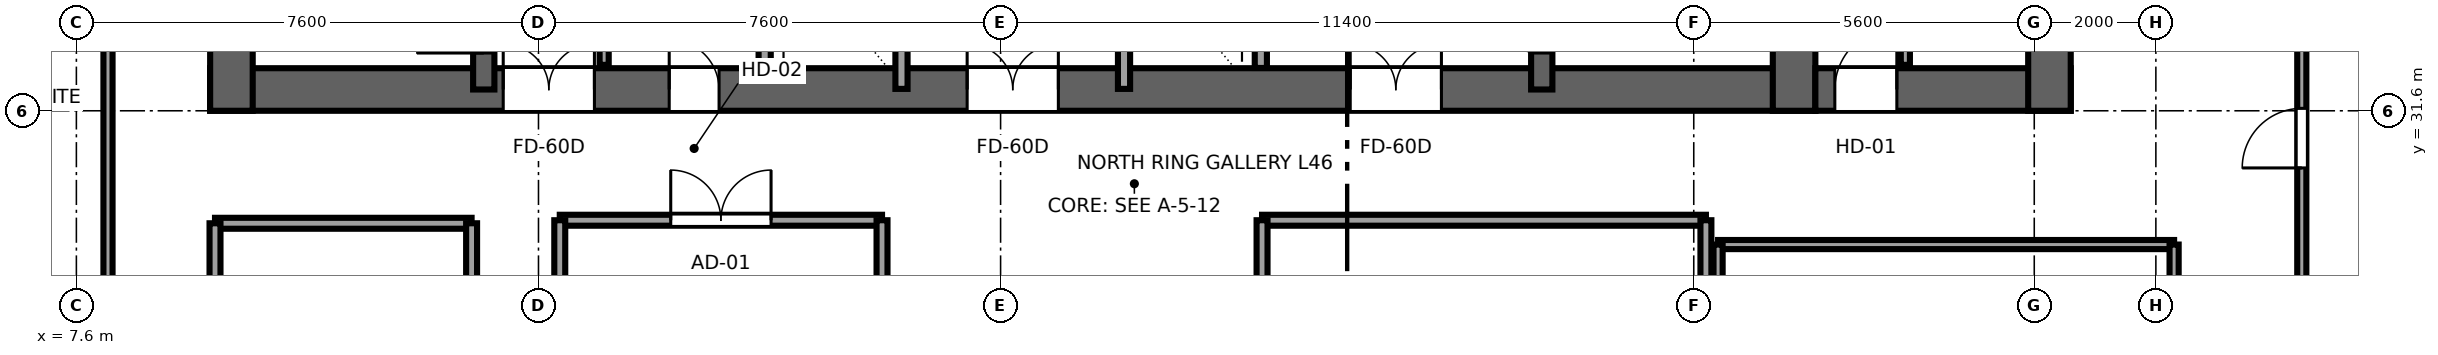
"""IFC4 building model, lengths in metres.
Left out: names, types, materials, properties, quantities, classifications, styles, units other than length and angle.
Written with IfcOpenShell. Run it as: python <this file> out.ifc"""

import sys

from ifc_helpers import new_model, si_unit, direction, frame, frame_2d, origin, place, context, subcontext, project, spatial, rectangle, extrude, source, transform, mapped, element, fill, save


model = new_model("IFC4")
c1 = context("Model", 3, precision=1e-05, world=origin(), true_north=direction((0.0, 1.0)))
c2 = subcontext(c1, "Body", "Model", "MODEL_VIEW")
j1 = project(units=[si_unit("LENGTHUNIT", "METRE"), si_unit("PLANEANGLEUNIT", "RADIAN")], contexts=[c1])
p1 = place(None, origin())
s1 = spatial("IfcSite", under=j1, at=p1, CompositionType="ELEMENT")
p2 = place(p1, origin())
s2 = spatial("IfcBuilding", under=s1, at=p2, CompositionType="ELEMENT")
p3 = place(p2, frame((0.0, 0.0, 175.45)))
s3 = spatial("IfcBuildingStorey", under=s2, at=p3, CompositionType="ELEMENT", Elevation=175.45)
p4 = place(p3, frame((9.8, 31.95, 0.0), z_axis=(0.0, 0.0, 1.0), x_axis=(1.0, 0.0, 0.0)))
e1 = element("IfcWall", 1, at=p4, inside=s3, PredefinedType="SHEAR", context=c2, shape_type="SweptSolid", body=[
    extrude(rectangle(XDim=26.4, YDim=0.7, at=frame_2d((13.2, 0.0))), origin(), (0.0, 0.0, 1.0), 3.55),
])
p5 = place(p4, frame((6.32, 0.0, 0.0), z_axis=(0.0, 0.0, 1.0), x_axis=(-1.0, 0.0, 0.0)))
e2 = element("IfcOpeningElement", 2, at=p5, cuts=e1, PredefinedType="OPENING", context=c2, shape_type="SweptSolid", body=[
    extrude(rectangle(XDim=1.5, YDim=2.04, at=frame_2d((0.75, 1.02))), frame((0.0, 0.36, 0.0), z_axis=(0.0, -1.0, 0.0), x_axis=(1.0, 0.0, 0.0)), (0.0, 0.0, 1.0), 0.72),
])
p6 = place(p4, frame((13.95, 0.0, 0.0), z_axis=(0.0, 0.0, 1.0), x_axis=(-1.0, 0.0, 0.0)))
e3 = element("IfcOpeningElement", 3, at=p6, cuts=e1, PredefinedType="OPENING", context=c2, shape_type="SweptSolid", body=[
    extrude(rectangle(XDim=1.5, YDim=2.04, at=frame_2d((0.75, 1.02))), frame((0.0, 0.36, 0.0), z_axis=(0.0, -1.0, 0.0), x_axis=(1.0, 0.0, 0.0)), (0.0, 0.0, 1.0), 0.72),
])
p7 = place(p4, frame((20.25, 0.0, 0.0), z_axis=(0.0, 0.0, 1.0), x_axis=(-1.0, 0.0, 0.0)))
e4 = element("IfcOpeningElement", 4, at=p7, cuts=e1, PredefinedType="OPENING", context=c2, shape_type="SweptSolid", body=[
    extrude(rectangle(XDim=1.5, YDim=2.04, at=frame_2d((0.75, 1.02))), frame((0.0, 0.36, 0.0), z_axis=(0.0, -1.0, 0.0), x_axis=(1.0, 0.0, 0.0)), (0.0, 0.0, 1.0), 0.72),
])
p8 = place(p4, frame((8.37, 0.0, 0.0), z_axis=(0.0, 0.0, 1.0), x_axis=(-1.0, 0.0, 0.0)))
e5 = element("IfcOpeningElement", 5, at=p8, cuts=e1, PredefinedType="OPENING", context=c2, shape_type="SweptSolid", body=[
    extrude(rectangle(XDim=0.82, YDim=2.01, at=frame_2d((0.41, 1.005))), frame((0.0, 0.36, 0.0), z_axis=(0.0, -1.0, 0.0), x_axis=(1.0, 0.0, 0.0)), (0.0, 0.0, 1.0), 0.72),
])
for number, where, z_axis, x_axis in (
    (6, (10.15, 31.6, 0.0), (0.0, 0.0, 1.0), (0.0, 1.0, 0.0)),
    (7, (35.85, 31.6, 0.0), (0.0, 0.0, 1.0), (0.0, 1.0, 0.0)),
):
    element("IfcWall", number, at=place(p3, frame(where, z_axis=z_axis, x_axis=x_axis)), inside=s3, PredefinedType="SHEAR", context=c2, shape_type="SweptSolid", body=[
        extrude(rectangle(XDim=13.6, YDim=0.7, at=frame_2d((6.8, 0.0))), origin(), (0.0, 0.0, 1.0), 3.55),
    ])
p9 = place(p3, frame((14.3, 31.95, 0.0), z_axis=(0.0, 0.0, 1.0), x_axis=(0.0, 1.0, 0.0)))
e8 = element("IfcWall", 8, at=p9, inside=s3, PredefinedType="SHEAR", context=c2, shape_type="SweptSolid", body=[
    extrude(rectangle(XDim=12.9, YDim=0.35, at=frame_2d((6.45, 0.0))), origin(), (0.0, 0.0, 1.0), 3.55),
])
p10 = place(p9, frame((0.6, 0.0, 0.0)))
e9 = element("IfcOpeningElement", 9, at=p10, cuts=e8, PredefinedType="OPENING", context=c2, shape_type="SweptSolid", body=[
    extrude(rectangle(XDim=1.1, YDim=2.12, at=frame_2d((0.55, 1.06))), frame((0.0, 0.185, 0.0), z_axis=(0.0, -1.0, 0.0), x_axis=(1.0, 0.0, 0.0)), (0.0, 0.0, 1.0), 0.37),
])
p11 = place(p3, frame((31.7, 31.95, 0.0), z_axis=(0.0, 0.0, 1.0), x_axis=(0.0, 1.0, 0.0)))
e10 = element("IfcWall", 10, at=p11, inside=s3, PredefinedType="SHEAR", context=c2, shape_type="SweptSolid", body=[
    extrude(rectangle(XDim=12.9, YDim=0.35, at=frame_2d((6.45, 0.0))), origin(), (0.0, 0.0, 1.0), 3.55),
])
p12 = place(p11, frame((1.7, 0.0, 0.0), z_axis=(0.0, 0.0, 1.0), x_axis=(-1.0, 0.0, 0.0)))
e11 = element("IfcOpeningElement", 11, at=p12, cuts=e10, PredefinedType="OPENING", context=c2, shape_type="SweptSolid", body=[
    extrude(rectangle(XDim=1.1, YDim=2.12, at=frame_2d((0.55, 1.06))), frame((0.0, 0.185, 0.0), z_axis=(0.0, -1.0, 0.0), x_axis=(1.0, 0.0, 0.0)), (0.0, 0.0, 1.0), 0.37),
])
p13 = place(p3, frame((36.2, 31.95, 0.0), z_axis=(0.0, 0.0, 1.0), x_axis=(1.0, 0.0, 0.0)))
e12 = element("IfcWall", 12, at=p13, inside=s3, PredefinedType="SHEAR", context=c2, shape_type="SweptSolid", body=[
    extrude(rectangle(XDim=4.2, YDim=0.7, at=frame_2d((2.1, 0.0))), origin(), (0.0, 0.0, 1.0), 3.55),
])
p14 = place(p13, frame((1.34, 0.0, 0.0), z_axis=(0.0, 0.0, 1.0), x_axis=(-1.0, 0.0, 0.0)))
e13 = element("IfcOpeningElement", 13, at=p14, cuts=e12, PredefinedType="OPENING", context=c2, shape_type="SweptSolid", body=[
    extrude(rectangle(XDim=1.02, YDim=2.03, at=frame_2d((0.51, 1.015))), frame((0.0, 0.36, 0.0), z_axis=(0.0, -1.0, 0.0), x_axis=(1.0, 0.0, 0.0)), (0.0, 0.0, 1.0), 0.72),
])
p15 = place(p3, frame((40.05, 31.6, 0.0), z_axis=(0.0, 0.0, 1.0), x_axis=(0.0, 1.0, 0.0)))
e14 = element("IfcWall", 14, at=p15, inside=s3, PredefinedType="SHEAR", context=c2, shape_type="SweptSolid", body=[
    extrude(rectangle(XDim=13.6, YDim=0.7, at=frame_2d((6.8, 0.0))), origin(), (0.0, 0.0, 1.0), 3.55),
])
for number, where, z_axis, x_axis in (
    (15, (18.92, 32.304, 0.0), (0.0, 0.0, 1.0), (0.0, 1.0, 0.0)),
    (16, (27.08, 32.304, 0.0), (0.0, 0.0, 1.0), (0.0, 1.0, 0.0)),
):
    element("IfcWall", number, at=place(p3, frame(where, z_axis=z_axis, x_axis=x_axis)), inside=s3, PredefinedType="SOLIDWALL", context=c2, shape_type="SweptSolid", body=[
        extrude(rectangle(XDim=3.846, YDim=0.2, at=frame_2d((1.923, 0.0))), origin(), (0.0, 0.0, 1.0), 3.37),
    ])
p16 = place(p3, frame((21.17, 31.96, 0.0), z_axis=(0.0, 0.0, 1.0), x_axis=(0.0, 1.0, 0.0)))
e17 = element("IfcWall", 17, at=p16, inside=s3, PredefinedType="SOLIDWALL", context=c2, shape_type="SweptSolid", body=[
    extrude(rectangle(XDim=12.58, YDim=0.2, at=frame_2d((6.29, 0.0))), origin(), (0.0, 0.0, 1.0), 3.37),
])
p17 = place(p16, frame((5.74, 0.0, 0.0)))
e18 = element("IfcOpeningElement", 18, at=p17, cuts=e17, PredefinedType="OPENING", context=c2, shape_type="SweptSolid", body=[
    extrude(rectangle(XDim=1.1, YDim=2.12, at=frame_2d((0.55, 1.06))), frame((0.0, 0.11, 0.0), z_axis=(0.0, -1.0, 0.0), x_axis=(1.0, 0.0, 0.0)), (0.0, 0.0, 1.0), 0.22),
])
p18 = place(p16, frame((8.24, 0.0, 0.0)))
e19 = element("IfcOpeningElement", 19, at=p18, cuts=e17, PredefinedType="OPENING", context=c2, shape_type="SweptSolid", body=[
    extrude(rectangle(XDim=1.1, YDim=2.12, at=frame_2d((0.55, 1.06))), frame((0.0, 0.11, 0.0), z_axis=(0.0, -1.0, 0.0), x_axis=(1.0, 0.0, 0.0)), (0.0, 0.0, 1.0), 0.22),
])
p19 = place(p3, frame((24.83, 31.96, 0.0), z_axis=(0.0, 0.0, 1.0), x_axis=(0.0, 1.0, 0.0)))
e20 = element("IfcWall", 20, at=p19, inside=s3, PredefinedType="SOLIDWALL", context=c2, shape_type="SweptSolid", body=[
    extrude(rectangle(XDim=12.58, YDim=0.2, at=frame_2d((6.29, 0.0))), origin(), (0.0, 0.0, 1.0), 3.37),
])
p20 = place(p19, frame((5.74, 0.0, 0.0)))
e21 = element("IfcOpeningElement", 21, at=p20, cuts=e20, PredefinedType="OPENING", context=c2, shape_type="SweptSolid", body=[
    extrude(rectangle(XDim=1.1, YDim=2.12, at=frame_2d((0.55, 1.06))), frame((0.0, 0.11, 0.0), z_axis=(0.0, -1.0, 0.0), x_axis=(1.0, 0.0, 0.0)), (0.0, 0.0, 1.0), 0.22),
])
p21 = place(p19, frame((8.24, 0.0, 0.0)))
e22 = element("IfcOpeningElement", 22, at=p21, cuts=e20, PredefinedType="OPENING", context=c2, shape_type="SweptSolid", body=[
    extrude(rectangle(XDim=1.1, YDim=2.12, at=frame_2d((0.55, 1.06))), frame((0.0, 0.11, 0.0), z_axis=(0.0, -1.0, 0.0), x_axis=(1.0, 0.0, 0.0)), (0.0, 0.0, 1.0), 0.22),
])
p22 = place(p3, frame((16.28, 32.355, 0.0), z_axis=(0.0, 0.0, 1.0), x_axis=(0.0, 1.0, 0.0)))
e23 = element("IfcWall", 23, at=p22, inside=s3, PredefinedType="PARTITIONING", context=c2, shape_type="SweptSolid", body=[
    extrude(rectangle(XDim=0.865, YDim=0.15, at=frame_2d((0.433, 0.0))), origin(), (0.0, 0.0, 1.0), 3.37),
])
p23 = place(p3, frame((37.68, 32.355, 0.0), z_axis=(0.0, 0.0, 1.0), x_axis=(0.0, 1.0, 0.0)))
e24 = element("IfcWall", 24, at=p23, inside=s3, PredefinedType="PARTITIONING", context=c2, shape_type="SweptSolid", body=[
    extrude(rectangle(XDim=3.845, YDim=0.15, at=frame_2d((1.922, 0.0))), origin(), (0.0, 0.0, 1.0), 3.37),
])
p24 = place(p23, frame((1.413, 0.0, 0.0)))
e25 = element("IfcOpeningElement", 25, at=p24, cuts=e24, PredefinedType="OPENING", context=c2, shape_type="SweptSolid", body=[
    extrude(rectangle(XDim=1.02, YDim=2.03, at=frame_2d((0.51, 1.015))), frame((0.0, 0.085, 0.0), z_axis=(0.0, -1.0, 0.0), x_axis=(1.0, 0.0, 0.0)), (0.0, 0.0, 1.0), 0.17),
])
p25 = place(p3, frame((8.12, 20.78, 0.0), z_axis=(0.0, 0.0, 1.0), x_axis=(0.0, 1.0, 0.0)))
e26 = element("IfcWall", 26, at=p25, inside=s3, PredefinedType="PARTITIONING", context=c2, shape_type="SweptSolid", body=[
    extrude(rectangle(XDim=13.54, YDim=0.15, at=frame_2d((6.77, 0.0))), origin(), (0.0, 0.0, 1.0), 3.37),
])
p26 = place(p25, frame((6.28, 0.0, 0.0)))
e27 = element("IfcOpeningElement", 27, at=p26, cuts=e26, PredefinedType="OPENING", context=c2, shape_type="SweptSolid", body=[
    extrude(rectangle(XDim=0.98, YDim=2.12, at=frame_2d((0.49, 1.06))), frame((0.0, 0.085, 0.0), z_axis=(0.0, -1.0, 0.0), x_axis=(1.0, 0.0, 0.0)), (0.0, 0.0, 1.0), 0.17),
])
p27 = place(p3, frame((44.2, 24.78, 0.0), z_axis=(0.0, 0.0, 1.0), x_axis=(0.0, 1.0, 0.0)))
e28 = element("IfcWall", 28, at=p27, inside=s3, PredefinedType="PARTITIONING", context=c2, shape_type="SweptSolid", body=[
    extrude(rectangle(XDim=12.74, YDim=0.15, at=frame_2d((6.37, 0.0))), origin(), (0.0, 0.0, 1.0), 3.37),
])
p28 = place(p27, frame((5.88, 0.0, 0.0)))
e29 = element("IfcOpeningElement", 29, at=p28, cuts=e28, PredefinedType="OPENING", context=c2, shape_type="SweptSolid", body=[
    extrude(rectangle(XDim=0.98, YDim=2.12, at=frame_2d((0.49, 1.06))), frame((0.0, 0.085, 0.0), z_axis=(0.0, -1.0, 0.0), x_axis=(1.0, 0.0, 0.0)), (0.0, 0.0, 1.0), 0.17),
])
p29 = place(p3, frame((9.88, 29.75, 0.0), z_axis=(0.0, 0.0, 1.0), x_axis=(1.0, 0.0, 0.0)))
e30 = element("IfcWall", 30, at=p29, inside=s3, PredefinedType="PARTITIONING", context=c2, shape_type="SweptSolid", body=[
    extrude(rectangle(XDim=4.22, YDim=0.18, at=frame_2d((2.11, 0.0))), origin(), (0.0, 0.0, 1.0), 3.37),
])
for number, where, z_axis, x_axis in (
    (31, (9.88, 20.7, 0.0), (0.0, 0.0, 1.0), (0.0, 1.0, 0.0)),
    (32, (14.1, 20.7, 0.0), (0.0, 0.0, 1.0), (0.0, 1.0, 0.0)),
):
    element("IfcWall", number, at=place(p3, frame(where, z_axis=z_axis, x_axis=x_axis)), inside=s3, PredefinedType="PARTITIONING", context=c2, shape_type="SweptSolid", body=[
        extrude(rectangle(XDim=9.05, YDim=0.18, at=frame_2d((4.525, 0.0))), origin(), (0.0, 0.0, 1.0), 3.37),
    ])
p30 = place(p3, frame((27.1, 29.8, 0.0), z_axis=(0.0, 0.0, 1.0), x_axis=(1.0, 0.0, 0.0)))
e33 = element("IfcWall", 33, at=p30, inside=s3, PredefinedType="PARTITIONING", context=c2, shape_type="SweptSolid", body=[
    extrude(rectangle(XDim=7.3, YDim=0.18, at=frame_2d((3.65, 0.0))), origin(), (0.0, 0.0, 1.0), 3.37),
])
for number, where, z_axis, x_axis in (
    (34, (27.1, 20.7, 0.0), (0.0, 0.0, 1.0), (0.0, 1.0, 0.0)),
    (35, (34.4, 20.7, 0.0), (0.0, 0.0, 1.0), (0.0, 1.0, 0.0)),
):
    element("IfcWall", number, at=place(p3, frame(where, z_axis=z_axis, x_axis=x_axis)), inside=s3, PredefinedType="PARTITIONING", context=c2, shape_type="SweptSolid", body=[
        extrude(rectangle(XDim=9.1, YDim=0.18, at=frame_2d((4.55, 0.0))), origin(), (0.0, 0.0, 1.0), 3.37),
    ])
p31 = place(p3, frame((15.55, 29.8, 0.0), z_axis=(0.0, 0.0, 1.0), x_axis=(1.0, 0.0, 0.0)))
e36 = element("IfcWall", 36, at=p31, inside=s3, PredefinedType="PARTITIONING", context=c2, shape_type="SweptSolid", body=[
    extrude(rectangle(XDim=5.3, YDim=0.18, at=frame_2d((2.65, 0.0))), origin(), (0.0, 0.0, 1.0), 3.37),
])
p32 = place(p31, frame((1.825, 0.0, 0.0)))
e37 = element("IfcOpeningElement", 37, at=p32, cuts=e36, PredefinedType="OPENING", context=c2, shape_type="SweptSolid", body=[
    extrude(rectangle(XDim=1.65, YDim=2.15, at=frame_2d((0.825, 1.075))), frame((0.0, 0.1, 0.0), z_axis=(0.0, -1.0, 0.0), x_axis=(1.0, 0.0, 0.0)), (0.0, 0.0, 1.0), 0.2),
])
for number, where, z_axis, x_axis in (
    (38, (15.55, 24.92, 0.0), (0.0, 0.0, 1.0), (0.0, 1.0, 0.0)),
    (39, (20.85, 24.92, 0.0), (0.0, 0.0, 1.0), (0.0, 1.0, 0.0)),
):
    element("IfcWall", number, at=place(p3, frame(where, z_axis=z_axis, x_axis=x_axis)), inside=s3, PredefinedType="PARTITIONING", context=c2, shape_type="SweptSolid", body=[
        extrude(rectangle(XDim=4.88, YDim=0.18, at=frame_2d((2.44, 0.0))), origin(), (0.0, 0.0, 1.0), 3.37),
    ])
p33 = place(p3, frame((34.6, 29.4, 0.0), z_axis=(0.0, 0.0, 1.0), x_axis=(1.0, 0.0, 0.0)))
e40 = element("IfcWall", 40, at=p33, inside=s3, PredefinedType="PARTITIONING", context=c2, shape_type="SweptSolid", body=[
    extrude(rectangle(XDim=7.5, YDim=0.15, at=frame_2d((3.75, 0.0))), origin(), (0.0, 0.0, 1.0), 3.37),
])
p34 = place(p3, frame((34.6, 20.7, 0.0), z_axis=(0.0, 0.0, 1.0), x_axis=(0.0, 1.0, 0.0)))
e41 = element("IfcWall", 41, at=p34, inside=s3, PredefinedType="PARTITIONING", context=c2, shape_type="SweptSolid", body=[
    extrude(rectangle(XDim=8.7, YDim=0.15, at=frame_2d((4.35, 0.0))), origin(), (0.0, 0.0, 1.0), 3.37),
])
p35 = place(p3, frame((42.1, 20.7, 0.0), z_axis=(0.0, 0.0, 1.0), x_axis=(0.0, 1.0, 0.0)))
e42 = element("IfcWall", 42, at=p35, inside=s3, PredefinedType="PARTITIONING", context=c2, shape_type="SweptSolid", body=[
    extrude(rectangle(XDim=8.7, YDim=0.15, at=frame_2d((4.35, 0.0))), origin(), (0.0, 0.0, 1.0), 2.16),
])
m1 = source(origin(), c2, "Body", "SweptSolid", [
    extrude(rectangle(XDim=1.1, YDim=2.12, at=frame_2d((0.55, 1.06))), frame((0.0, 0.025, 0.0), z_axis=(0.0, -1.0, 0.0), x_axis=(1.0, 0.0, 0.0)), (0.0, 0.0, 1.0), 0.05),
])
p36 = place(p10, origin())
e43 = element("IfcDoor", 43, at=p36, inside=s3, OperationType="SINGLE_SWING_LEFT", PredefinedType="DOOR", context=c2, shape_type="MappedRepresentation", body=[
    mapped(m1, transform((0.0, 0.0, 0.0), x_axis=(1.0, 0.0, 0.0), y_axis=(0.0, 1.0, 0.0), z_axis=(0.0, 0.0, 1.0), scale=1.0)),
])
fill(e9, e43)
p37 = place(p12, origin())
e44 = element("IfcDoor", 44, at=p37, inside=s3, OperationType="SINGLE_SWING_RIGHT", PredefinedType="DOOR", context=c2, shape_type="MappedRepresentation", body=[
    mapped(m1, transform((0.0, 0.0, 0.0), x_axis=(1.0, 0.0, 0.0), y_axis=(0.0, 1.0, 0.0), z_axis=(0.0, 0.0, 1.0), scale=1.0)),
])
fill(e11, e44)
m2 = source(origin(), c2, "Body", "SweptSolid", [
    extrude(rectangle(XDim=1.5, YDim=2.04, at=frame_2d((0.75, 1.02))), frame((0.0, 0.025, 0.0), z_axis=(0.0, -1.0, 0.0), x_axis=(1.0, 0.0, 0.0)), (0.0, 0.0, 1.0), 0.05),
])
p38 = place(p5, origin())
e45 = element("IfcDoor", 45, at=p38, inside=s3, OperationType="DOUBLE_DOOR_SINGLE_SWING", PredefinedType="DOOR", context=c2, shape_type="MappedRepresentation", body=[
    mapped(m2, transform((0.0, 0.0, 0.0), x_axis=(1.0, 0.0, 0.0), y_axis=(0.0, 1.0, 0.0), z_axis=(0.0, 0.0, 1.0), scale=1.0)),
])
fill(e2, e45)
p39 = place(p6, origin())
e46 = element("IfcDoor", 46, at=p39, inside=s3, OperationType="DOUBLE_DOOR_SINGLE_SWING", PredefinedType="DOOR", context=c2, shape_type="MappedRepresentation", body=[
    mapped(m2, transform((0.0, 0.0, 0.0), x_axis=(1.0, 0.0, 0.0), y_axis=(0.0, 1.0, 0.0), z_axis=(0.0, 0.0, 1.0), scale=1.0)),
])
fill(e3, e46)
p40 = place(p7, origin())
e47 = element("IfcDoor", 47, at=p40, inside=s3, OperationType="DOUBLE_DOOR_SINGLE_SWING", PredefinedType="DOOR", context=c2, shape_type="MappedRepresentation", body=[
    mapped(m2, transform((0.0, 0.0, 0.0), x_axis=(1.0, 0.0, 0.0), y_axis=(0.0, 1.0, 0.0), z_axis=(0.0, 0.0, 1.0), scale=1.0)),
])
fill(e4, e47)
m3 = source(origin(), c2, "Body", "SweptSolid", [
    extrude(rectangle(XDim=0.82, YDim=2.01, at=frame_2d((0.41, 1.005))), frame((0.0, 0.025, 0.0), z_axis=(0.0, -1.0, 0.0), x_axis=(1.0, 0.0, 0.0)), (0.0, 0.0, 1.0), 0.05),
])
p41 = place(p8, origin())
e48 = element("IfcDoor", 48, at=p41, inside=s3, OperationType="SINGLE_SWING_LEFT", PredefinedType="DOOR", context=c2, shape_type="MappedRepresentation", body=[
    mapped(m3, transform((0.0, 0.0, 0.0), x_axis=(1.0, 0.0, 0.0), y_axis=(0.0, 1.0, 0.0), z_axis=(0.0, 0.0, 1.0), scale=1.0)),
])
fill(e5, e48)
m4 = source(origin(), c2, "Body", "SweptSolid", [
    extrude(rectangle(XDim=1.02, YDim=2.03, at=frame_2d((0.51, 1.015))), frame((0.0, 0.025, 0.0), z_axis=(0.0, -1.0, 0.0), x_axis=(1.0, 0.0, 0.0)), (0.0, 0.0, 1.0), 0.05),
])
p42 = place(p14, origin())
e49 = element("IfcDoor", 49, at=p42, inside=s3, OperationType="SINGLE_SWING_RIGHT", PredefinedType="DOOR", context=c2, shape_type="MappedRepresentation", body=[
    mapped(m4, transform((0.0, 0.0, 0.0), x_axis=(1.0, 0.0, 0.0), y_axis=(0.0, 1.0, 0.0), z_axis=(0.0, 0.0, 1.0), scale=1.0)),
])
fill(e13, e49)
m5 = source(origin(), c2, "Body", "SweptSolid", [
    extrude(rectangle(XDim=0.98, YDim=2.12, at=frame_2d((0.49, 1.06))), frame((0.0, 0.025, 0.0), z_axis=(0.0, -1.0, 0.0), x_axis=(1.0, 0.0, 0.0)), (0.0, 0.0, 1.0), 0.05),
])
p43 = place(p28, origin())
e50 = element("IfcDoor", 50, at=p43, inside=s3, OperationType="SINGLE_SWING_LEFT", PredefinedType="DOOR", context=c2, shape_type="MappedRepresentation", body=[
    mapped(m5, transform((0.0, 0.0, 0.0), x_axis=(1.0, 0.0, 0.0), y_axis=(0.0, 1.0, 0.0), z_axis=(0.0, 0.0, 1.0), scale=1.0)),
])
fill(e29, e50)
m6 = source(origin(), c2, "Body", "SweptSolid", [
    extrude(rectangle(XDim=1.65, YDim=2.15, at=frame_2d((0.825, 1.075))), frame((0.0, 0.025, 0.0), z_axis=(0.0, -1.0, 0.0), x_axis=(1.0, 0.0, 0.0)), (0.0, 0.0, 1.0), 0.05),
])
p44 = place(p32, origin())
e51 = element("IfcDoor", 51, at=p44, inside=s3, OperationType="DOUBLE_DOOR_SINGLE_SWING", PredefinedType="DOOR", context=c2, shape_type="MappedRepresentation", body=[
    mapped(m6, transform((0.0, 0.0, 0.0), x_axis=(1.0, 0.0, 0.0), y_axis=(0.0, 1.0, 0.0), z_axis=(0.0, 0.0, 1.0), scale=1.0)),
])
fill(e37, e51)
save(model, sys.argv[1])
